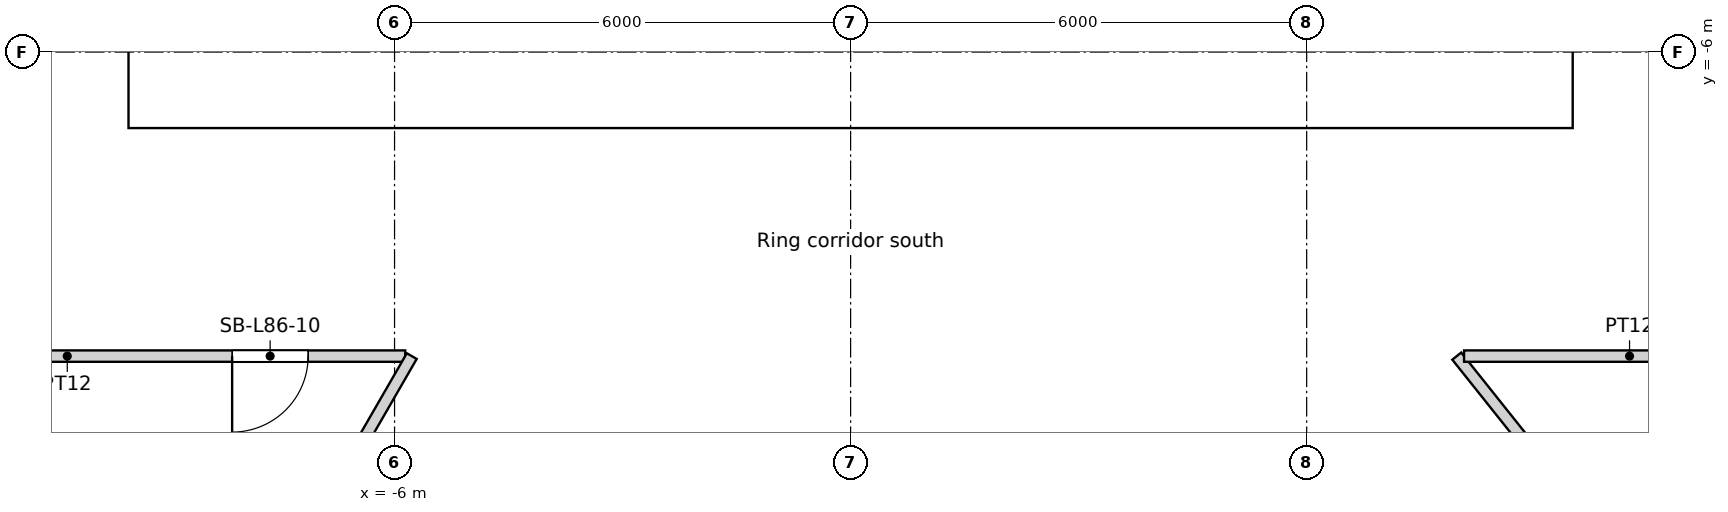
"""IFC4 building model, lengths in metres.
Left out: names, types, materials, properties, quantities, classifications, styles, units other than length and angle.
Written with IfcOpenShell. Run it as: python <this file> out.ifc"""

import sys

from ifc_helpers import new_model, si_unit, direction, frame, frame_2d, origin, place, context, subcontext, project, spatial, rectangle, extrude, element, fill, save


model = new_model("IFC4")
c1 = context("Model", 3, precision=1e-05, world=origin(), true_north=direction((0.0, 1.0)))
c2 = subcontext(c1, "Body", "Model", "MODEL_VIEW")
j1 = project(units=[si_unit("LENGTHUNIT", "METRE"), si_unit("PLANEANGLEUNIT", "RADIAN")], contexts=[c1])
p1 = place(None, origin())
s1 = spatial("IfcSite", under=j1, at=p1, CompositionType="ELEMENT")
p2 = place(p1, origin())
s2 = spatial("IfcBuilding", under=s1, at=p2, CompositionType="ELEMENT")
p3 = place(p2, frame((0.0, 0.0, 330.6)))
s3 = spatial("IfcBuildingStorey", under=s2, at=p3, CompositionType="ELEMENT", Elevation=330.6)
p4 = place(p3, frame((-9.5, -6.7, 0.0), z_axis=(0.0, 0.0, 1.0), x_axis=(1.0, 0.0, 0.0)))
e1 = element("IfcWall", 1, at=p4, inside=s3, PredefinedType="SOLIDWALL", context=c2, shape_type="SweptSolid", body=[
    extrude(rectangle(XDim=19.0, YDim=0.6, at=frame_2d((9.5, 0.0))), origin(), (0.0, 0.0, 1.0), 5.4),
])
p5 = place(p4, frame((10.4, 0.0, 0.0)))
e2 = element("IfcOpeningElement", 2, at=p5, cuts=e1, PredefinedType="OPENING", context=c2, shape_type="SweptSolid", body=[
    extrude(rectangle(XDim=1.0, YDim=2.1, at=frame_2d((0.5, 1.05))), frame((0.0, 0.3, 0.0), z_axis=(0.0, -1.0, 0.0), x_axis=(1.0, 0.0, 0.0)), (0.0, 0.0, 1.0), 0.6),
])
p6 = place(p4, frame((5.35, 0.0, 0.0)))
e3 = element("IfcOpeningElement", 3, at=p6, cuts=e1, PredefinedType="OPENING", context=c2, shape_type="SweptSolid", body=[
    extrude(rectangle(XDim=1.7, YDim=2.1, at=frame_2d((0.85, 1.05))), frame((0.0, 0.3, 0.0), z_axis=(0.0, -1.0, 0.0), x_axis=(1.0, 0.0, 0.0)), (0.0, 0.0, 1.0), 0.6),
])
p7 = place(p4, frame((11.95, 0.0, 0.0)))
e4 = element("IfcOpeningElement", 4, at=p7, cuts=e1, PredefinedType="OPENING", context=c2, shape_type="SweptSolid", body=[
    extrude(rectangle(XDim=1.7, YDim=2.1, at=frame_2d((0.85, 1.05))), frame((0.0, 0.3, 0.0), z_axis=(0.0, -1.0, 0.0), x_axis=(1.0, 0.0, 0.0)), (0.0, 0.0, 1.0), 0.6),
])
p8 = place(p3, frame((-9.2, -6.4, 0.0), z_axis=(0.0, 0.0, 1.0), x_axis=(0.0, 1.0, 0.0)))
e5 = element("IfcWall", 5, at=p8, inside=s3, PredefinedType="SOLIDWALL", context=c2, shape_type="SweptSolid", body=[
    extrude(rectangle(XDim=12.8, YDim=0.6, at=frame_2d((6.4, 0.0))), origin(), (0.0, 0.0, 1.0), 5.4),
])
p9 = place(p3, frame((9.2, -6.4, 0.0), z_axis=(0.0, 0.0, 1.0), x_axis=(0.0, 1.0, 0.0)))
e6 = element("IfcWall", 6, at=p9, inside=s3, PredefinedType="SOLIDWALL", context=c2, shape_type="SweptSolid", body=[
    extrude(rectangle(XDim=12.8, YDim=0.6, at=frame_2d((6.4, 0.0))), origin(), (0.0, 0.0, 1.0), 5.4),
])
p10 = place(p9, frame((6.4, 0.0, 0.0)))
e7 = element("IfcOpeningElement", 7, at=p10, cuts=e6, PredefinedType="OPENING", context=c2, shape_type="SweptSolid", body=[
    extrude(rectangle(XDim=1.8, YDim=2.1, at=frame_2d((0.9, 1.05))), frame((0.0, 0.3, 0.0), z_axis=(0.0, -1.0, 0.0), x_axis=(1.0, 0.0, 0.0)), (0.0, 0.0, 1.0), 0.6),
])
for number, where, z_axis, x_axis in (
    (8, (-2.25, -6.4, 0.0), (0.0, 0.0, 1.0), (0.0, 1.0, 0.0)),
    (9, (0.55, -6.4, 0.0), (0.0, 0.0, 1.0), (0.0, 1.0, 0.0)),
    (10, (2.25, -6.4, 0.0), (0.0, 0.0, 1.0), (0.0, 1.0, 0.0)),
):
    element("IfcWall", number, at=place(p3, frame(where, z_axis=z_axis, x_axis=x_axis)), inside=s3, PredefinedType="SOLIDWALL", context=c2, shape_type="SweptSolid", body=[
        extrude(rectangle(XDim=3.15, YDim=0.3, at=frame_2d((1.575, 0.0))), origin(), (0.0, 0.0, 1.0), 5.05),
    ])
p11 = place(p3, frame((-5.86, -10.0, 0.0), z_axis=(0.0, 0.0, 1.0), x_axis=(-1.0, 0.0, 0.0)))
e11 = element("IfcWall", 11, at=p11, inside=s3, PredefinedType="PARTITIONING", context=c2, shape_type="SweptSolid", body=[
    extrude(rectangle(XDim=6.565, YDim=0.15, at=frame_2d((3.282, 0.0))), origin(), (0.0, 0.0, 1.0), 4.6),
])
p12 = place(p11, frame((1.277, 0.0, 0.0)))
e12 = element("IfcOpeningElement", 12, at=p12, cuts=e11, PredefinedType="OPENING", context=c2, shape_type="SweptSolid", body=[
    extrude(rectangle(XDim=1.0, YDim=2.1, at=frame_2d((0.5, 1.05))), frame((0.0, 0.075, 0.0), z_axis=(0.0, -1.0, 0.0), x_axis=(1.0, 0.0, 0.0)), (0.0, 0.0, 1.0), 0.15),
])
p13 = place(p3, frame((-8.278, -14.339, 0.0), z_axis=(0.0, 0.0, 1.0), x_axis=(0.499996650831, 0.866027337419, 0.0)))
e13 = element("IfcWall", 13, at=p13, inside=s3, PredefinedType="PARTITIONING", context=c2, shape_type="SweptSolid", body=[
    extrude(rectangle(XDim=5.01, YDim=0.15, at=frame_2d((2.505, 0.0))), origin(), (0.0, 0.0, 1.0), 4.6),
])
p14 = place(p3, frame((8.071, -10.0, 0.0), z_axis=(0.0, 0.0, 1.0), x_axis=(1.0, 0.0, 0.0)))
e14 = element("IfcWall", 14, at=p14, inside=s3, PredefinedType="PARTITIONING", context=c2, shape_type="SweptSolid", body=[
    extrude(rectangle(XDim=4.354, YDim=0.15, at=frame_2d((2.177, 0.0))), origin(), (0.0, 0.0, 1.0), 4.6),
])
p15 = place(p3, frame((10.196, -12.785, 0.0), z_axis=(0.0, 0.0, 1.0), x_axis=(-0.623516027281, 0.781810567672, 0.0)))
e15 = element("IfcWall", 15, at=p15, inside=s3, PredefinedType="PARTITIONING", context=c2, shape_type="SweptSolid", body=[
    extrude(rectangle(XDim=3.563, YDim=0.15, at=frame_2d((1.781, 0.0))), origin(), (0.0, 0.0, 1.0), 4.6),
])
p16 = place(p5, origin())
e16 = element("IfcDoor", 16, at=p16, inside=s3, OperationType="SINGLE_SWING_LEFT", PredefinedType="DOOR", context=c2, shape_type="SweptSolid", body=[
    extrude(rectangle(XDim=1.0, YDim=2.1, at=frame_2d((0.5, 1.05))), frame((0.0, 0.025, 0.0), z_axis=(0.0, -1.0, 0.0), x_axis=(1.0, 0.0, 0.0)), (0.0, 0.0, 1.0), 0.05),
])
fill(e2, e16)
p17 = place(p6, origin())
e17 = element("IfcDoor", 17, at=p17, inside=s3, OperationType="DOUBLE_DOOR_SINGLE_SWING", PredefinedType="DOOR", context=c2, shape_type="SweptSolid", body=[
    extrude(rectangle(XDim=1.7, YDim=2.1, at=frame_2d((0.85, 1.05))), frame((0.0, 0.025, 0.0), z_axis=(0.0, -1.0, 0.0), x_axis=(1.0, 0.0, 0.0)), (0.0, 0.0, 1.0), 0.05),
])
fill(e3, e17)
p18 = place(p7, origin())
e18 = element("IfcDoor", 18, at=p18, inside=s3, OperationType="DOUBLE_DOOR_SINGLE_SWING", PredefinedType="DOOR", context=c2, shape_type="SweptSolid", body=[
    extrude(rectangle(XDim=1.7, YDim=2.1, at=frame_2d((0.85, 1.05))), frame((0.0, 0.025, 0.0), z_axis=(0.0, -1.0, 0.0), x_axis=(1.0, 0.0, 0.0)), (0.0, 0.0, 1.0), 0.05),
])
fill(e4, e18)
p19 = place(p12, origin())
e19 = element("IfcDoor", 19, at=p19, inside=s3, OperationType="SINGLE_SWING_RIGHT", PredefinedType="DOOR", context=c2, shape_type="SweptSolid", body=[
    extrude(rectangle(XDim=1.0, YDim=2.1, at=frame_2d((0.5, 1.05))), frame((0.0, 0.025, 0.0), z_axis=(0.0, -1.0, 0.0), x_axis=(1.0, 0.0, 0.0)), (0.0, 0.0, 1.0), 0.05),
])
fill(e12, e19)
save(model, sys.argv[1])
